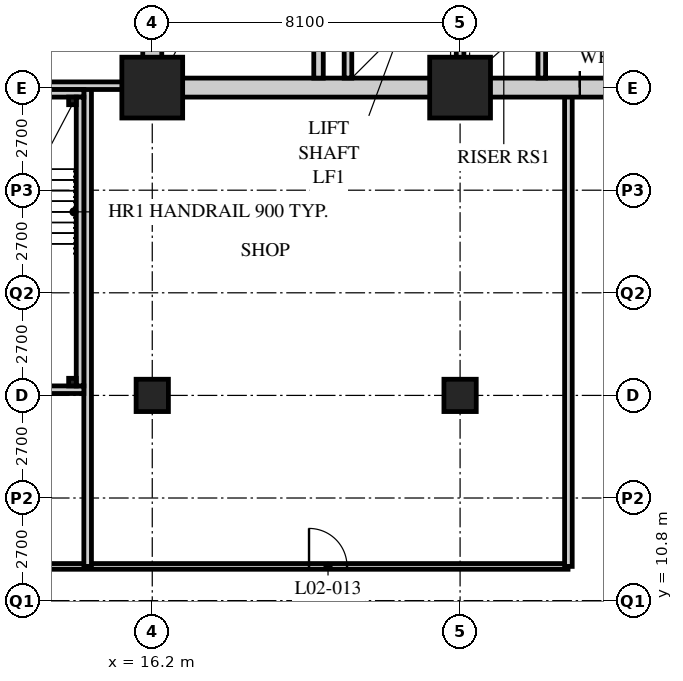
"""IFC4 building model, lengths in metres.
Left out: names, types, materials, properties, quantities, classifications, styles, units other than length and angle.
Written with IfcOpenShell. Run it as: python <this file> out.ifc"""

import sys

from ifc_helpers import new_model, si_unit, direction, frame, frame_2d, origin, origin_2d, place, context, subcontext, project, spatial, rectangle, hollow_rectangle, extrude, element, fill, save


model = new_model("IFC4")
c1 = context("Model", 3, precision=1e-05, world=origin(), true_north=direction((0.0, 1.0)))
c2 = subcontext(c1, "Body", "Model", "MODEL_VIEW")
j1 = project(units=[si_unit("LENGTHUNIT", "METRE"), si_unit("PLANEANGLEUNIT", "RADIAN")], contexts=[c1])
p1 = place(None, origin())
s1 = spatial("IfcSite", under=j1, at=p1, CompositionType="ELEMENT")
p2 = place(p1, origin())
s2 = spatial("IfcBuilding", under=s1, at=p2, CompositionType="ELEMENT")
p3 = place(p2, frame((0.0, 0.0, 11.4)))
s3 = spatial("IfcBuildingStorey", under=s2, at=p3, CompositionType="ELEMENT", Elevation=11.4)
p4 = place(p3, frame((16.2, 16.2, 0.0), z_axis=(0.0, 0.0, 1.0), x_axis=(1.0, 0.0, 0.0)))
e1 = element("IfcColumn", 1, at=p4, inside=s3, PredefinedType="COLUMN", context=c2, shape_type="SweptSolid", body=[
    extrude(hollow_rectangle(XDim=0.85, YDim=0.85, WallThickness=0.085, at=origin_2d()), origin(), (0.0, 0.0, 1.0), 5.4),
])
p5 = place(p3, frame((16.2, 24.3, 0.0), z_axis=(0.0, 0.0, 1.0), x_axis=(1.0, 0.0, 0.0)))
e2 = element("IfcColumn", 2, at=p5, inside=s3, PredefinedType="COLUMN", context=c2, shape_type="SweptSolid", body=[
    extrude(hollow_rectangle(XDim=1.6, YDim=1.6, WallThickness=0.15, at=origin_2d()), origin(), (0.0, 0.0, 1.0), 5.4),
])
p6 = place(p3, frame((24.3, 16.2, 0.0), z_axis=(0.0, 0.0, 1.0), x_axis=(1.0, 0.0, 0.0)))
e3 = element("IfcColumn", 3, at=p6, inside=s3, PredefinedType="COLUMN", context=c2, shape_type="SweptSolid", body=[
    extrude(hollow_rectangle(XDim=0.85, YDim=0.85, WallThickness=0.085, at=origin_2d()), origin(), (0.0, 0.0, 1.0), 5.4),
])
p7 = place(p3, frame((24.3, 24.3, 0.0), z_axis=(0.0, 0.0, 1.0), x_axis=(1.0, 0.0, 0.0)))
e4 = element("IfcColumn", 4, at=p7, inside=s3, PredefinedType="COLUMN", context=c2, shape_type="SweptSolid", body=[
    extrude(hollow_rectangle(XDim=1.6, YDim=1.6, WallThickness=0.15, at=origin_2d()), origin(), (0.0, 0.0, 1.0), 5.4),
])
p8 = place(p3, frame((3.6, 11.7, 0.0), z_axis=(0.0, 0.0, 1.0), x_axis=(1.0, 0.0, 0.0)))
e5 = element("IfcWall", 5, at=p8, inside=s3, PredefinedType="PARTITIONING", context=c2, shape_type="SweptSolid", body=[
    extrude(rectangle(XDim=23.54, YDim=0.15, at=frame_2d((11.77, 0.0))), origin(), (0.0, 0.0, 1.0), 5.15),
])
p9 = place(p8, frame((1.087, 0.0, 0.0)))
e6 = element("IfcOpeningElement", 6, at=p9, cuts=e5, PredefinedType="OPENING", context=c2, shape_type="SweptSolid", body=[
    extrude(rectangle(XDim=1.0, YDim=2.1, at=frame_2d((0.5, 1.05))), frame((0.0, 0.085, 0.0), z_axis=(0.0, -1.0, 0.0), x_axis=(1.0, 0.0, 0.0)), (0.0, 0.0, 1.0), 0.17),
])
p10 = place(p8, frame((4.237, 0.0, 0.0)))
e7 = element("IfcOpeningElement", 7, at=p10, cuts=e5, PredefinedType="OPENING", context=c2, shape_type="SweptSolid", body=[
    extrude(rectangle(XDim=1.0, YDim=2.1, at=frame_2d((0.5, 1.05))), frame((0.0, 0.085, 0.0), z_axis=(0.0, -1.0, 0.0), x_axis=(1.0, 0.0, 0.0)), (0.0, 0.0, 1.0), 0.17),
])
p11 = place(p8, frame((16.725, 0.0, 0.0)))
e8 = element("IfcOpeningElement", 8, at=p11, cuts=e5, PredefinedType="OPENING", context=c2, shape_type="SweptSolid", body=[
    extrude(rectangle(XDim=1.0, YDim=2.1, at=frame_2d((0.5, 1.05))), frame((0.0, 0.085, 0.0), z_axis=(0.0, -1.0, 0.0), x_axis=(1.0, 0.0, 0.0)), (0.0, 0.0, 1.0), 0.17),
])
for number, where, z_axis, x_axis in (
    (9, (14.5, 11.7, 0.0), (0.0, 0.0, 1.0), (0.0, 1.0, 0.0)),
    (10, (27.15, 11.7, 0.0), (0.0, 0.0, 1.0), (0.0, 1.0, 0.0)),
):
    element("IfcWall", number, at=place(p3, frame(where, z_axis=z_axis, x_axis=x_axis)), inside=s3, PredefinedType="SOLIDWALL", context=c2, shape_type="SweptSolid", body=[
        extrude(rectangle(XDim=12.6, YDim=0.2, at=frame_2d((6.3, 0.0))), origin(), (0.0, 0.0, 1.0), 5.15),
    ])
p12 = place(p3, frame((3.6, 24.35, 0.0), z_axis=(0.0, 0.0, 1.0), x_axis=(1.0, 0.0, 0.0)))
e11 = element("IfcWall", 11, at=p12, inside=s3, PredefinedType="SOLIDWALL", context=c2, shape_type="SweptSolid", body=[
    extrude(rectangle(XDim=12.6, YDim=0.2, at=frame_2d((6.3, 0.0))), origin(), (0.0, 0.0, 1.0), 4.538),
])
p13 = place(p3, frame((15.95, 24.3, 0.0), z_axis=(0.0, 0.0, 1.0), x_axis=(1.0, 0.0, 0.0)))
e12 = element("IfcWall", 12, at=p13, inside=s3, PredefinedType="SOLIDWALL", context=c2, shape_type="SweptSolid", body=[
    extrude(rectangle(XDim=24.8, YDim=0.5, at=frame_2d((12.4, 0.0))), origin(), (0.0, 0.0, 1.0), 4.5),
])
p14 = place(p13, frame((11.5, 0.0, 0.0)))
e13 = element("IfcOpeningElement", 13, at=p14, cuts=e12, PredefinedType="OPENING", context=c2, shape_type="SweptSolid", body=[
    extrude(rectangle(XDim=1.8, YDim=2.4, at=frame_2d((0.9, 1.2))), frame((0.0, 0.26, 0.0), z_axis=(0.0, -1.0, 0.0), x_axis=(1.0, 0.0, 0.0)), (0.0, 0.0, 1.0), 0.52),
])
p15 = place(p3, frame((16.2, 24.55, 0.0), z_axis=(0.0, 0.0, 1.0), x_axis=(0.0, 1.0, 0.0)))
e14 = element("IfcWall", 14, at=p15, inside=s3, PredefinedType="SOLIDWALL", context=c2, shape_type="SweptSolid", body=[
    extrude(rectangle(XDim=15.7, YDim=0.5, at=frame_2d((7.85, 0.0))), origin(), (0.0, 0.0, 1.0), 4.538),
])
p16 = place(p3, frame((24.3, 24.55, 0.0), z_axis=(0.0, 0.0, 1.0), x_axis=(0.0, 1.0, 0.0)))
e15 = element("IfcWall", 15, at=p16, inside=s3, PredefinedType="SOLIDWALL", context=c2, shape_type="SweptSolid", body=[
    extrude(rectangle(XDim=7.75, YDim=0.2, at=frame_2d((3.875, 0.0))), origin(), (0.0, 0.0, 1.0), 4.45),
])
p17 = place(p16, frame((4.6, 0.0, 0.0)))
e16 = element("IfcOpeningElement", 16, at=p17, cuts=e15, PredefinedType="OPENING", context=c2, shape_type="SweptSolid", body=[
    extrude(rectangle(XDim=1.2, YDim=2.1, at=frame_2d((0.6, 1.05))), frame((0.0, 0.11, 0.0), z_axis=(0.0, -1.0, 0.0), x_axis=(1.0, 0.0, 0.0)), (0.0, 0.0, 1.0), 0.22),
])
p18 = place(p3, frame((20.575, 24.55, 0.0), z_axis=(0.0, 0.0, 1.0), x_axis=(0.0, 1.0, 0.0)))
e17 = element("IfcWall", 17, at=p18, inside=s3, PredefinedType="SOLIDWALL", context=c2, shape_type="SweptSolid", body=[
    extrude(rectangle(XDim=7.75, YDim=0.25, at=frame_2d((3.875, 0.0))), origin(), (0.0, 0.0, 1.0), 5.15),
])
p19 = place(p18, frame((6.2, 0.0, 0.0)))
e18 = element("IfcOpeningElement", 18, at=p19, cuts=e17, PredefinedType="OPENING", context=c2, shape_type="SweptSolid", body=[
    extrude(rectangle(XDim=1.2, YDim=2.1, at=frame_2d((0.6, 1.05))), frame((0.0, 0.135, 0.0), z_axis=(0.0, -1.0, 0.0), x_axis=(1.0, 0.0, 0.0)), (0.0, 0.0, 1.0), 0.27),
])
p20 = place(p3, frame((21.35, 24.55, 0.0), z_axis=(0.0, 0.0, 1.0), x_axis=(0.0, 1.0, 0.0)))
e19 = element("IfcWall", 19, at=p20, inside=s3, PredefinedType="SOLIDWALL", context=c2, shape_type="SweptSolid", body=[
    extrude(rectangle(XDim=2.6, YDim=0.2, at=frame_2d((1.3, 0.0))), origin(), (0.0, 0.0, 1.0), 5.15),
])
p21 = place(p3, frame((26.45, 24.55, 0.0), z_axis=(0.0, 0.0, 1.0), x_axis=(0.0, 1.0, 0.0)))
e20 = element("IfcWall", 20, at=p21, inside=s3, PredefinedType="SOLIDWALL", context=c2, shape_type="SweptSolid", body=[
    extrude(rectangle(XDim=1.6, YDim=0.2, at=frame_2d((0.8, 0.0))), origin(), (0.0, 0.0, 1.0), 5.15),
])
p22 = place(p3, frame((10.0, 16.35, 0.0), z_axis=(0.0, 0.0, 1.0), x_axis=(1.0, 0.0, 0.0)))
e21 = element("IfcWall", 21, at=p22, inside=s3, PredefinedType="SOLIDWALL", context=c2, shape_type="SweptSolid", body=[
    extrude(rectangle(XDim=4.4, YDim=0.2, at=frame_2d((2.2, 0.0))), origin(), (0.0, 0.0, 1.0), 4.538),
])
p23 = place(p22, frame((1.6, 0.0, 0.0)))
e22 = element("IfcOpeningElement", 22, at=p23, cuts=e21, PredefinedType="OPENING", context=c2, shape_type="SweptSolid", body=[
    extrude(rectangle(XDim=1.2, YDim=2.1, at=frame_2d((0.6, 1.05))), frame((0.0, 0.11, 0.0), z_axis=(0.0, -1.0, 0.0), x_axis=(1.0, 0.0, 0.0)), (0.0, 0.0, 1.0), 0.22),
])
p24 = place(p3, frame((10.0, 24.15, 0.0), z_axis=(0.0, 0.0, 1.0), x_axis=(1.0, 0.0, 0.0)))
e23 = element("IfcWall", 23, at=p24, inside=s3, PredefinedType="SOLIDWALL", context=c2, shape_type="SweptSolid", body=[
    extrude(rectangle(XDim=4.4, YDim=0.2, at=frame_2d((2.2, 0.0))), origin(), (0.0, 0.0, 1.0), 4.538),
])
p25 = place(p3, frame((14.3, 16.45, 0.0), z_axis=(0.0, 0.0, 1.0), x_axis=(0.0, 1.0, 0.0)))
e24 = element("IfcWall", 24, at=p25, inside=s3, PredefinedType="SOLIDWALL", context=c2, shape_type="SweptSolid", body=[
    extrude(rectangle(XDim=7.6, YDim=0.2, at=frame_2d((3.8, 0.0))), origin(), (0.0, 0.0, 1.0), 5.15),
])
for number, where, z_axis, x_axis in (
    (25, (14.1, 23.95, 0.0), (0.0, 0.0, 1.0), (1.0, 0.0, 0.0)),
    (26, (14.1, 16.55, 0.0), (0.0, 0.0, 1.0), (1.0, 0.0, 0.0)),
):
    element("IfcColumn", number, at=place(p3, frame(where, z_axis=z_axis, x_axis=x_axis)), inside=s3, PredefinedType="COLUMN", context=c2, shape_type="SweptSolid", body=[
        extrude(hollow_rectangle(XDim=0.2, YDim=0.2, WallThickness=0.012, at=origin_2d()), origin(), (0.0, 0.0, 1.0), 5.4),
    ])
p26 = place(p11, origin())
e27 = element("IfcDoor", 27, at=p26, inside=s3, OperationType="SINGLE_SWING_LEFT", PredefinedType="DOOR", context=c2, shape_type="SweptSolid", body=[
    extrude(rectangle(XDim=1.0, YDim=2.1, at=frame_2d((0.5, 1.05))), frame((0.0, 0.025, 0.0), z_axis=(0.0, -1.0, 0.0), x_axis=(1.0, 0.0, 0.0)), (0.0, 0.0, 1.0), 0.05),
])
fill(e8, e27)
p27 = place(p14, origin())
e28 = element("IfcDoor", 28, at=p27, inside=s3, OperationType="DOUBLE_DOOR_SINGLE_SWING", PredefinedType="DOOR", context=c2, shape_type="SweptSolid", body=[
    extrude(rectangle(XDim=1.8, YDim=2.4, at=frame_2d((0.9, 1.2))), frame((0.0, 0.025, 0.0), z_axis=(0.0, -1.0, 0.0), x_axis=(1.0, 0.0, 0.0)), (0.0, 0.0, 1.0), 0.05),
])
fill(e13, e28)
save(model, sys.argv[1])
